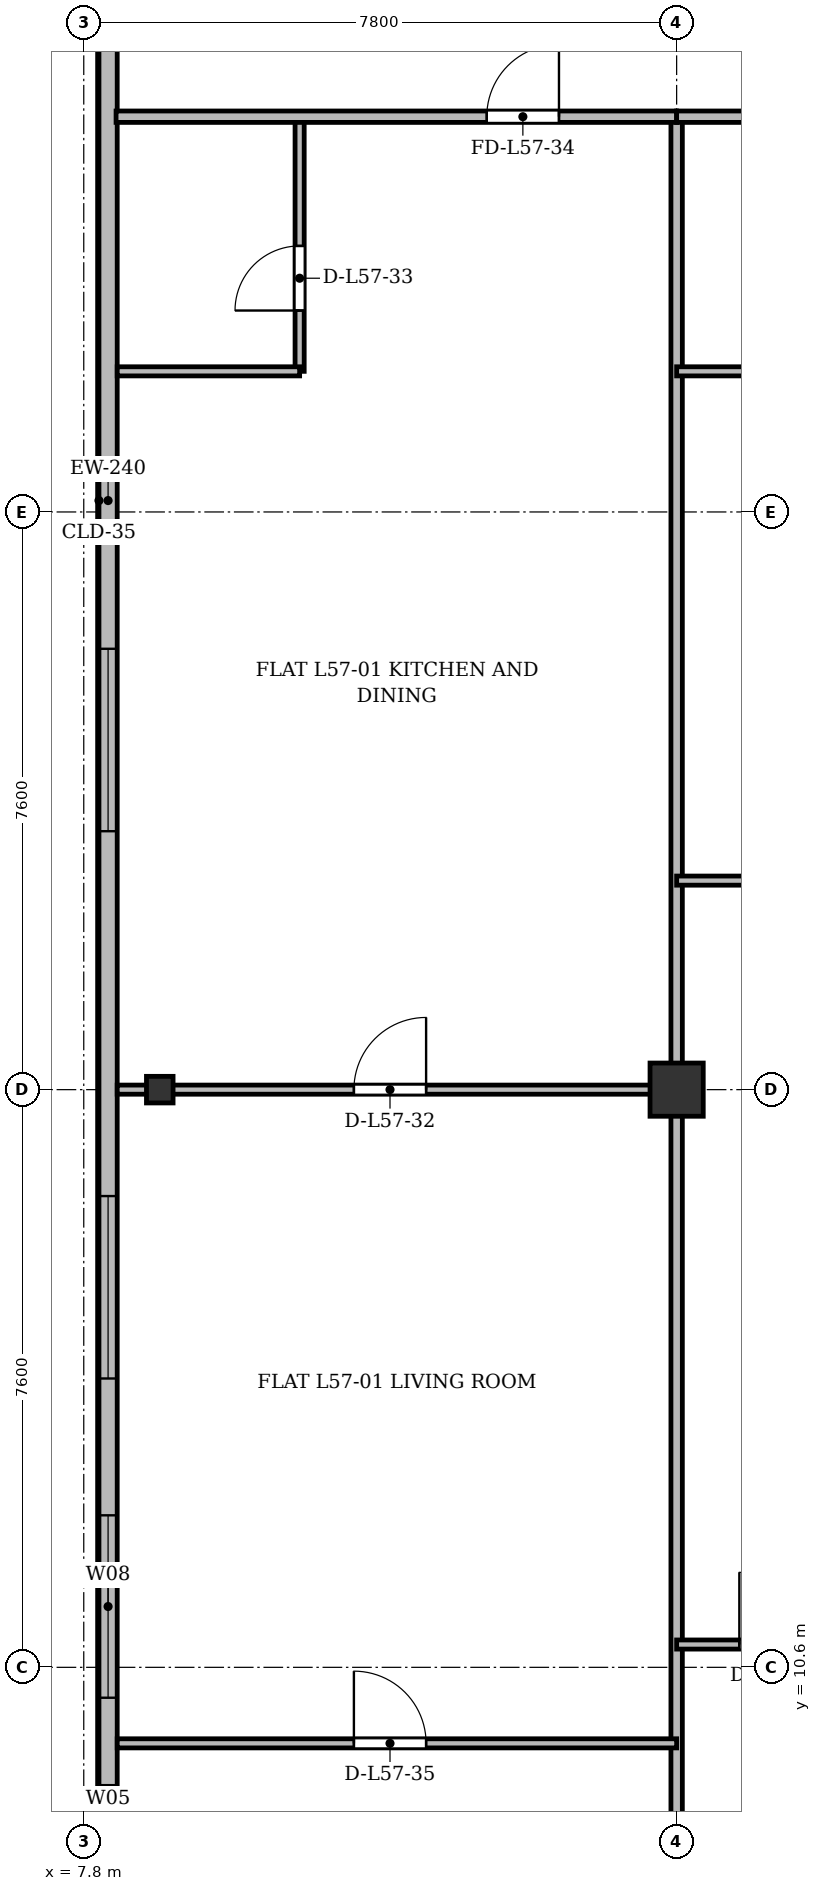
"""IFC4 building model, lengths in metres.
Left out: names, types, materials, properties, quantities, classifications, styles, units other than length and angle.
Written with IfcOpenShell. Run it as: python <this file> out.ifc"""

import sys

from ifc_helpers import new_model, si_unit, direction, frame, frame_2d, origin, origin_2d, place, context, subcontext, project, spatial, rectangle, i_section, extrude, source, transform, mapped, element, fill, save


model = new_model("IFC4")
c1 = context("Model", 3, precision=1e-05, world=origin(), true_north=direction((0.0, 1.0)))
c2 = subcontext(c1, "Body", "Model", "MODEL_VIEW")
j1 = project(units=[si_unit("LENGTHUNIT", "METRE"), si_unit("PLANEANGLEUNIT", "RADIAN")], contexts=[c1])
p1 = place(None, origin())
s1 = spatial("IfcSite", under=j1, at=p1, CompositionType="ELEMENT")
p2 = place(p1, origin())
s2 = spatial("IfcBuilding", under=s1, at=p2, CompositionType="ELEMENT")
p3 = place(p2, frame((0.0, 0.0, 219.3)))
s3 = spatial("IfcBuildingStorey", under=s2, at=p3, CompositionType="ELEMENT", Elevation=219.3)
m1 = source(origin(), c2, "Body", "SweptSolid", [
    extrude(i_section(OverallWidth=0.35, OverallDepth=0.35, WebThickness=0.018, FlangeThickness=0.028, at=origin_2d()), origin(), (0.0, 0.0, 1.0), 3.6),
])
p4 = place(p3, frame((8.8, 18.2, 0.0), z_axis=(0.0, 0.0, 1.0), x_axis=(1.0, 0.0, 0.0)))
e1 = element("IfcColumn", 1, at=p4, inside=s3, PredefinedType="COLUMN", context=c2, shape_type="MappedRepresentation", body=[
    mapped(m1, transform((0.0, 0.0, 0.0), x_axis=(1.0, 0.0, 0.0), y_axis=(0.0, 1.0, 0.0), z_axis=(0.0, 0.0, 1.0), scale=1.0)),
])
m2 = source(origin(), c2, "Body", "SweptSolid", [
    extrude(rectangle(XDim=0.7, YDim=0.7, at=origin_2d()), origin(), (0.0, 0.0, 1.0), 3.6),
])
p5 = place(p3, frame((15.6, 18.2, 0.0), z_axis=(0.0, 0.0, 1.0), x_axis=(1.0, 0.0, 0.0)))
e2 = element("IfcColumn", 2, at=p5, inside=s3, PredefinedType="COLUMN", context=c2, shape_type="MappedRepresentation", body=[
    mapped(m2, transform((0.0, 0.0, 0.0), x_axis=(1.0, 0.0, 0.0), y_axis=(0.0, 1.0, 0.0), z_axis=(0.0, 0.0, 1.0), scale=1.0)),
])
p6 = place(p3, frame((8.12, 6.4, 0.0), z_axis=(0.0, 0.0, 1.0), x_axis=(0.0, 1.0, 0.0)))
e3 = element("IfcWall", 3, at=p6, inside=s3, PredefinedType="SOLIDWALL", context=c2, shape_type="SweptSolid", body=[
    extrude(rectangle(XDim=39.1, YDim=0.24, at=frame_2d((19.55, 0.0))), origin(), (0.0, 0.0, 1.0), 3.36),
])
p7 = place(p6, frame((1.45, 0.0, 0.92)))
e4 = element("IfcOpeningElement", 4, at=p7, cuts=e3, PredefinedType="OPENING", context=c2, shape_type="SweptSolid", body=[
    extrude(rectangle(XDim=1.2, YDim=1.65, at=frame_2d((0.6, 0.825))), frame((0.0, 0.13, 0.0), z_axis=(0.0, -1.0, 0.0), x_axis=(1.0, 0.0, 0.0)), (0.0, 0.0, 1.0), 0.26),
])
p8 = place(p6, frame((3.8, 0.0, 0.92)))
e5 = element("IfcOpeningElement", 5, at=p8, cuts=e3, PredefinedType="OPENING", context=c2, shape_type="SweptSolid", body=[
    extrude(rectangle(XDim=2.4, YDim=2.1, at=frame_2d((1.2, 1.05))), frame((0.0, 0.13, 0.0), z_axis=(0.0, -1.0, 0.0), x_axis=(1.0, 0.0, 0.0)), (0.0, 0.0, 1.0), 0.26),
])
p9 = place(p6, frame((8.0, 0.0, 0.92)))
e6 = element("IfcOpeningElement", 6, at=p9, cuts=e3, PredefinedType="OPENING", context=c2, shape_type="SweptSolid", body=[
    extrude(rectangle(XDim=2.4, YDim=2.1, at=frame_2d((1.2, 1.05))), frame((0.0, 0.13, 0.0), z_axis=(0.0, -1.0, 0.0), x_axis=(1.0, 0.0, 0.0)), (0.0, 0.0, 1.0), 0.26),
])
p10 = place(p6, frame((15.2, 0.0, 0.92)))
e7 = element("IfcOpeningElement", 7, at=p10, cuts=e3, PredefinedType="OPENING", context=c2, shape_type="SweptSolid", body=[
    extrude(rectangle(XDim=2.4, YDim=2.1, at=frame_2d((1.2, 1.05))), frame((0.0, 0.13, 0.0), z_axis=(0.0, -1.0, 0.0), x_axis=(1.0, 0.0, 0.0)), (0.0, 0.0, 1.0), 0.26),
])
p11 = place(p6, frame((33.4, 0.0, 0.92)))
e8 = element("IfcOpeningElement", 8, at=p11, cuts=e3, PredefinedType="OPENING", context=c2, shape_type="SweptSolid", body=[
    extrude(rectangle(XDim=1.2, YDim=1.65, at=frame_2d((0.6, 0.825))), frame((0.0, 0.13, 0.0), z_axis=(0.0, -1.0, 0.0), x_axis=(1.0, 0.0, 0.0)), (0.0, 0.0, 1.0), 0.26),
])
p12 = place(p6, frame((36.75, 0.0, 0.92)))
e9 = element("IfcOpeningElement", 9, at=p12, cuts=e3, PredefinedType="OPENING", context=c2, shape_type="SweptSolid", body=[
    extrude(rectangle(XDim=1.2, YDim=1.65, at=frame_2d((0.6, 0.825))), frame((0.0, 0.13, 0.0), z_axis=(0.0, -1.0, 0.0), x_axis=(1.0, 0.0, 0.0)), (0.0, 0.0, 1.0), 0.26),
])
p13 = place(p3, frame((15.6, 3.625, 0.0), z_axis=(0.0, 0.0, 1.0), x_axis=(0.0, 1.0, 0.0)))
e10 = element("IfcWall", 10, at=p13, inside=s3, PredefinedType="PARTITIONING", context=c2, shape_type="SweptSolid", body=[
    extrude(rectangle(XDim=27.375, YDim=0.15, at=frame_2d((13.688, 0.0))), origin(), (0.0, 0.0, 1.0), 2.86),
])
p14 = place(p3, frame((8.24, 18.2, 0.0), z_axis=(0.0, 0.0, 1.0), x_axis=(1.0, 0.0, 0.0)))
e11 = element("IfcWall", 11, at=p14, inside=s3, PredefinedType="PARTITIONING", context=c2, shape_type="SweptSolid", body=[
    extrude(rectangle(XDim=7.36, YDim=0.12, at=frame_2d((3.68, 0.0))), origin(), (0.0, 0.0, 1.0), 2.91),
])
p15 = place(p14, frame((3.114, 0.0, 0.0)))
e12 = element("IfcOpeningElement", 12, at=p15, cuts=e11, PredefinedType="OPENING", context=c2, shape_type="SweptSolid", body=[
    extrude(rectangle(XDim=0.95, YDim=2.15, at=frame_2d((0.475, 1.075))), frame((0.0, 0.07, 0.0), z_axis=(0.0, -1.0, 0.0), x_axis=(1.0, 0.0, 0.0)), (0.0, 0.0, 1.0), 0.14),
])
p16 = place(p3, frame((10.64, 27.65, 0.0), z_axis=(0.0, 0.0, 1.0), x_axis=(0.0, 1.0, 0.0)))
e13 = element("IfcWall", 13, at=p16, inside=s3, PredefinedType="PARTITIONING", context=c2, shape_type="SweptSolid", body=[
    extrude(rectangle(XDim=3.35, YDim=0.12, at=frame_2d((1.675, 0.0))), origin(), (0.0, 0.0, 1.0), 3.36),
])
p17 = place(p16, frame((0.8, 0.0, 0.0)))
e14 = element("IfcOpeningElement", 14, at=p17, cuts=e13, PredefinedType="OPENING", context=c2, shape_type="SweptSolid", body=[
    extrude(rectangle(XDim=0.85, YDim=2.1, at=frame_2d((0.425, 1.05))), frame((0.0, 0.07, 0.0), z_axis=(0.0, -1.0, 0.0), x_axis=(1.0, 0.0, 0.0)), (0.0, 0.0, 1.0), 0.14),
])
p18 = place(p3, frame((8.24, 27.65, 0.0), z_axis=(0.0, 0.0, 1.0), x_axis=(1.0, 0.0, 0.0)))
e15 = element("IfcWall", 15, at=p18, inside=s3, PredefinedType="PARTITIONING", context=c2, shape_type="SweptSolid", body=[
    extrude(rectangle(XDim=2.4, YDim=0.12, at=frame_2d((1.2, 0.0))), origin(), (0.0, 0.0, 1.0), 2.86),
])
p19 = place(p3, frame((8.225, 31.0, 0.0), z_axis=(0.0, 0.0, 1.0), x_axis=(1.0, 0.0, 0.0)))
e16 = element("IfcWall", 16, at=p19, inside=s3, PredefinedType="PARTITIONING", context=c2, shape_type="SweptSolid", body=[
    extrude(rectangle(XDim=7.375, YDim=0.15, at=frame_2d((3.688, 0.0))), origin(), (0.0, 0.0, 1.0), 2.86),
])
p20 = place(p19, frame((4.877, 0.0, 0.0)))
e17 = element("IfcOpeningElement", 17, at=p20, cuts=e16, PredefinedType="OPENING", context=c2, shape_type="SweptSolid", body=[
    extrude(rectangle(XDim=0.95, YDim=2.15, at=frame_2d((0.475, 1.075))), frame((0.0, 0.085, 0.0), z_axis=(0.0, -1.0, 0.0), x_axis=(1.0, 0.0, 0.0)), (0.0, 0.0, 1.0), 0.17),
])
p21 = place(p3, frame((8.24, 9.6, 0.0), z_axis=(0.0, 0.0, 1.0), x_axis=(1.0, 0.0, 0.0)))
e18 = element("IfcWall", 18, at=p21, inside=s3, PredefinedType="PARTITIONING", context=c2, shape_type="SweptSolid", body=[
    extrude(rectangle(XDim=7.36, YDim=0.12, at=frame_2d((3.68, 0.0))), origin(), (0.0, 0.0, 1.0), 2.86),
])
p22 = place(p21, frame((3.114, 0.0, 0.0)))
e19 = element("IfcOpeningElement", 19, at=p22, cuts=e18, PredefinedType="OPENING", context=c2, shape_type="SweptSolid", body=[
    extrude(rectangle(XDim=0.95, YDim=2.15, at=frame_2d((0.475, 1.075))), frame((0.0, 0.07, 0.0), z_axis=(0.0, -1.0, 0.0), x_axis=(1.0, 0.0, 0.0)), (0.0, 0.0, 1.0), 0.14),
])
p23 = place(p3, frame((15.6, 20.95, 0.0), z_axis=(0.0, 0.0, 1.0), x_axis=(1.0, 0.0, 0.0)))
e20 = element("IfcWall", 20, at=p23, inside=s3, PredefinedType="PARTITIONING", context=c2, shape_type="SweptSolid", body=[
    extrude(rectangle(XDim=7.8, YDim=0.12, at=frame_2d((3.9, 0.0))), origin(), (0.0, 0.0, 1.0), 2.86),
])
p24 = place(p23, frame((3.333, 0.0, 0.0)))
e21 = element("IfcOpeningElement", 21, at=p24, cuts=e20, PredefinedType="OPENING", context=c2, shape_type="SweptSolid", body=[
    extrude(rectangle(XDim=0.95, YDim=2.15, at=frame_2d((0.475, 1.075))), frame((0.0, 0.07, 0.0), z_axis=(0.0, -1.0, 0.0), x_axis=(1.0, 0.0, 0.0)), (0.0, 0.0, 1.0), 0.14),
])
p25 = place(p3, frame((15.6, 27.65, 0.0), z_axis=(0.0, 0.0, 1.0), x_axis=(1.0, 0.0, 0.0)))
e22 = element("IfcWall", 22, at=p25, inside=s3, PredefinedType="PARTITIONING", context=c2, shape_type="SweptSolid", body=[
    extrude(rectangle(XDim=2.4, YDim=0.12, at=frame_2d((1.2, 0.0))), origin(), (0.0, 0.0, 1.0), 2.86),
])
p26 = place(p3, frame((15.6, 31.0, 0.0), z_axis=(0.0, 0.0, 1.0), x_axis=(1.0, 0.0, 0.0)))
e23 = element("IfcWall", 23, at=p26, inside=s3, PredefinedType="PARTITIONING", context=c2, shape_type="SweptSolid", body=[
    extrude(rectangle(XDim=7.8, YDim=0.15, at=frame_2d((3.9, 0.0))), origin(), (0.0, 0.0, 1.0), 2.86),
])
p27 = place(p26, frame((5.172, 0.0, 0.0)))
e24 = element("IfcOpeningElement", 24, at=p27, cuts=e23, PredefinedType="OPENING", context=c2, shape_type="SweptSolid", body=[
    extrude(rectangle(XDim=0.95, YDim=2.15, at=frame_2d((0.475, 1.075))), frame((0.0, 0.085, 0.0), z_axis=(0.0, -1.0, 0.0), x_axis=(1.0, 0.0, 0.0)), (0.0, 0.0, 1.0), 0.17),
])
p28 = place(p3, frame((15.6, 10.9, 0.0), z_axis=(0.0, 0.0, 1.0), x_axis=(1.0, 0.0, 0.0)))
e25 = element("IfcWall", 25, at=p28, inside=s3, PredefinedType="PARTITIONING", context=c2, shape_type="SweptSolid", body=[
    extrude(rectangle(XDim=2.6, YDim=0.12, at=frame_2d((1.3, 0.0))), origin(), (0.0, 0.0, 1.0), 2.86),
])
p29 = place(p28, frame((0.825, 0.0, 0.0)))
e26 = element("IfcOpeningElement", 26, at=p29, cuts=e25, PredefinedType="OPENING", context=c2, shape_type="SweptSolid", body=[
    extrude(rectangle(XDim=0.95, YDim=2.15, at=frame_2d((0.475, 1.075))), frame((0.0, 0.07, 0.0), z_axis=(0.0, -1.0, 0.0), x_axis=(1.0, 0.0, 0.0)), (0.0, 0.0, 1.0), 0.14),
])
m3 = source(origin(), c2, "Body", "SweptSolid", [
    extrude(rectangle(XDim=1.2, YDim=1.65, at=frame_2d((0.6, 0.825))), frame((0.0, 0.03, 0.0), z_axis=(0.0, -1.0, 0.0), x_axis=(1.0, 0.0, 0.0)), (0.0, 0.0, 1.0), 0.06),
])
p30 = place(p7, origin())
e27 = element("IfcWindow", 27, at=p30, inside=s3, PartitioningType="SINGLE_PANEL", PredefinedType="WINDOW", context=c2, shape_type="MappedRepresentation", body=[
    mapped(m3, transform((0.0, 0.0, 0.0), x_axis=(1.0, 0.0, 0.0), y_axis=(0.0, 1.0, 0.0), z_axis=(0.0, 0.0, 1.0), scale=1.0)),
])
fill(e4, e27)
m4 = source(origin(), c2, "Body", "SweptSolid", [
    extrude(rectangle(XDim=2.4, YDim=2.1, at=frame_2d((1.2, 1.05))), frame((0.0, 0.03, 0.0), z_axis=(0.0, -1.0, 0.0), x_axis=(1.0, 0.0, 0.0)), (0.0, 0.0, 1.0), 0.06),
])
p31 = place(p8, origin())
e28 = element("IfcWindow", 28, at=p31, inside=s3, PartitioningType="SINGLE_PANEL", PredefinedType="WINDOW", context=c2, shape_type="MappedRepresentation", body=[
    mapped(m4, transform((0.0, 0.0, 0.0), x_axis=(1.0, 0.0, 0.0), y_axis=(0.0, 1.0, 0.0), z_axis=(0.0, 0.0, 1.0), scale=1.0)),
])
fill(e5, e28)
p32 = place(p9, origin())
e29 = element("IfcWindow", 29, at=p32, inside=s3, PartitioningType="SINGLE_PANEL", PredefinedType="WINDOW", context=c2, shape_type="MappedRepresentation", body=[
    mapped(m4, transform((0.0, 0.0, 0.0), x_axis=(1.0, 0.0, 0.0), y_axis=(0.0, 1.0, 0.0), z_axis=(0.0, 0.0, 1.0), scale=1.0)),
])
fill(e6, e29)
p33 = place(p10, origin())
e30 = element("IfcWindow", 30, at=p33, inside=s3, PartitioningType="SINGLE_PANEL", PredefinedType="WINDOW", context=c2, shape_type="MappedRepresentation", body=[
    mapped(m4, transform((0.0, 0.0, 0.0), x_axis=(1.0, 0.0, 0.0), y_axis=(0.0, 1.0, 0.0), z_axis=(0.0, 0.0, 1.0), scale=1.0)),
])
fill(e7, e30)
m5 = source(origin(), c2, "Body", "SweptSolid", [
    extrude(rectangle(XDim=0.95, YDim=2.15, at=frame_2d((0.475, 1.075))), frame((0.0, 0.025, 0.0), z_axis=(0.0, -1.0, 0.0), x_axis=(1.0, 0.0, 0.0)), (0.0, 0.0, 1.0), 0.05),
])
p34 = place(p15, origin())
e31 = element("IfcDoor", 31, at=p34, inside=s3, OperationType="SINGLE_SWING_RIGHT", PredefinedType="DOOR", context=c2, shape_type="MappedRepresentation", body=[
    mapped(m5, transform((0.0, 0.0, 0.0), x_axis=(1.0, 0.0, 0.0), y_axis=(0.0, 1.0, 0.0), z_axis=(0.0, 0.0, 1.0), scale=1.0)),
])
fill(e12, e31)
m6 = source(origin(), c2, "Body", "SweptSolid", [
    extrude(rectangle(XDim=0.85, YDim=2.1, at=frame_2d((0.425, 1.05))), frame((0.0, 0.025, 0.0), z_axis=(0.0, -1.0, 0.0), x_axis=(1.0, 0.0, 0.0)), (0.0, 0.0, 1.0), 0.05),
])
p35 = place(p17, origin())
e32 = element("IfcDoor", 32, at=p35, inside=s3, OperationType="SINGLE_SWING_LEFT", PredefinedType="DOOR", context=c2, shape_type="MappedRepresentation", body=[
    mapped(m6, transform((0.0, 0.0, 0.0), x_axis=(1.0, 0.0, 0.0), y_axis=(0.0, 1.0, 0.0), z_axis=(0.0, 0.0, 1.0), scale=1.0)),
])
fill(e14, e32)
p36 = place(p20, origin())
e33 = element("IfcDoor", 33, at=p36, inside=s3, OperationType="SINGLE_SWING_RIGHT", PredefinedType="DOOR", context=c2, shape_type="MappedRepresentation", body=[
    mapped(m5, transform((0.0, 0.0, 0.0), x_axis=(1.0, 0.0, 0.0), y_axis=(0.0, 1.0, 0.0), z_axis=(0.0, 0.0, 1.0), scale=1.0)),
])
fill(e17, e33)
p37 = place(p22, origin())
e34 = element("IfcDoor", 34, at=p37, inside=s3, OperationType="SINGLE_SWING_LEFT", PredefinedType="DOOR", context=c2, shape_type="MappedRepresentation", body=[
    mapped(m5, transform((0.0, 0.0, 0.0), x_axis=(1.0, 0.0, 0.0), y_axis=(0.0, 1.0, 0.0), z_axis=(0.0, 0.0, 1.0), scale=1.0)),
])
fill(e19, e34)
p38 = place(p29, origin())
e35 = element("IfcDoor", 35, at=p38, inside=s3, OperationType="SINGLE_SWING_LEFT", PredefinedType="DOOR", context=c2, shape_type="MappedRepresentation", body=[
    mapped(m5, transform((0.0, 0.0, 0.0), x_axis=(1.0, 0.0, 0.0), y_axis=(0.0, 1.0, 0.0), z_axis=(0.0, 0.0, 1.0), scale=1.0)),
])
fill(e26, e35)
save(model, sys.argv[1])
